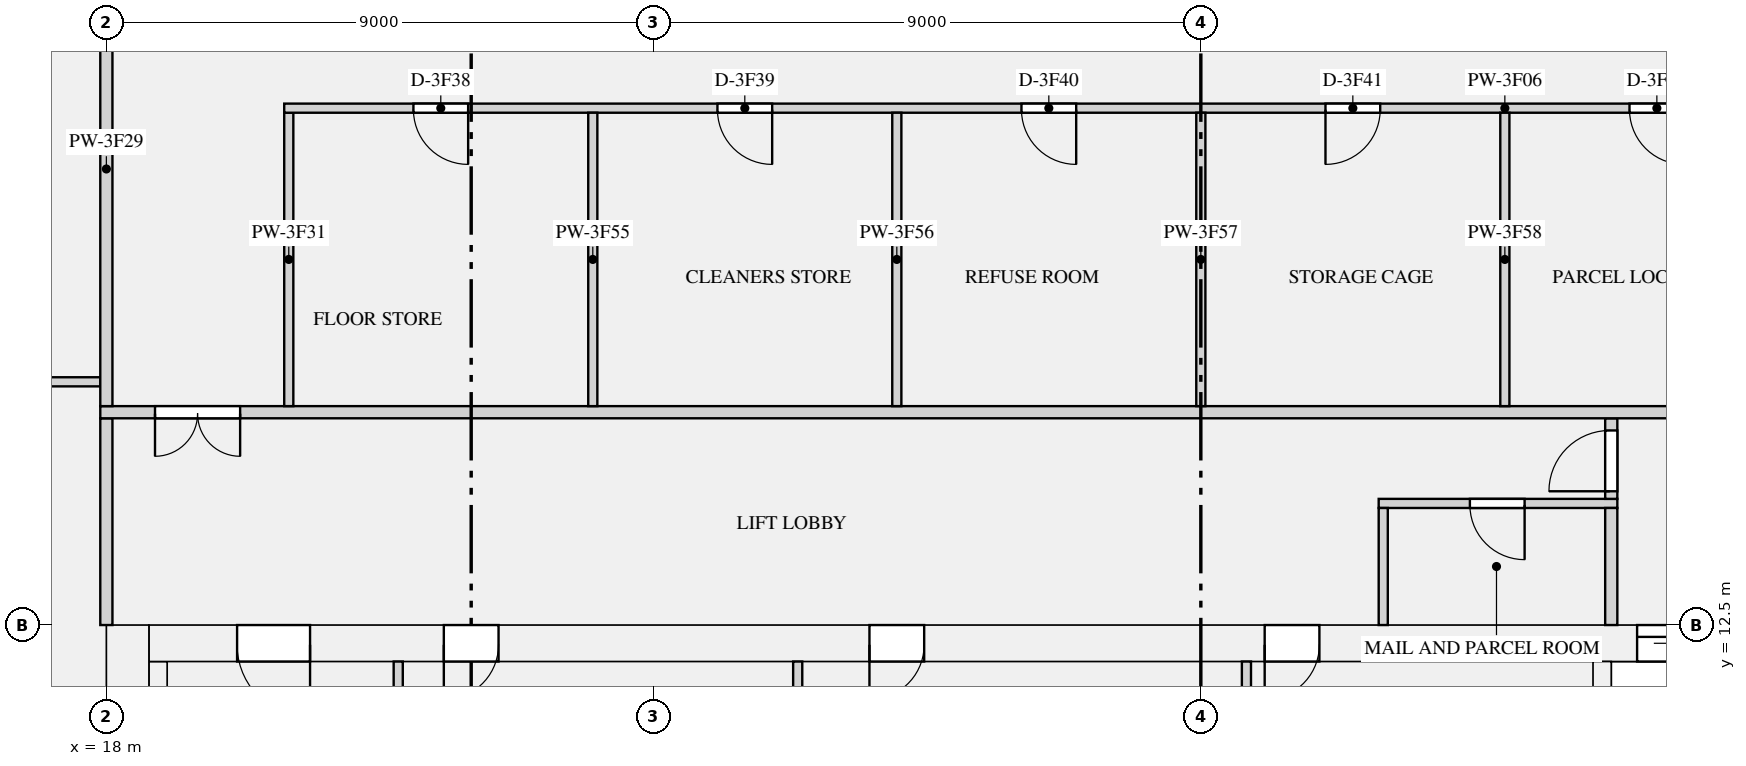
"""IFC4 building model, lengths in metres.
Left out: names, types, materials, properties, quantities, classifications, styles, units other than length and angle.
Written with IfcOpenShell. Run it as: python <this file> out.ifc"""

import sys

from ifc_helpers import new_model, si_unit, direction, frame, frame_2d, origin, place, context, subcontext, project, spatial, rectangle, extrude, element, fill, save


model = new_model("IFC4")
c1 = context("Model", 3, precision=1e-05, world=origin(), true_north=direction((0.0, 1.0)))
c2 = subcontext(c1, "Body", "Model", "MODEL_VIEW")
j1 = project(units=[si_unit("LENGTHUNIT", "METRE"), si_unit("PLANEANGLEUNIT", "RADIAN")], contexts=[c1])
p1 = place(None, origin())
s1 = spatial("IfcSite", under=j1, at=p1, CompositionType="ELEMENT")
p2 = place(p1, origin())
s2 = spatial("IfcBuilding", under=s1, at=p2, CompositionType="ELEMENT")
p3 = place(p2, frame((0.0, 0.0, 179.1)))
s3 = spatial("IfcBuildingStorey", under=s2, at=p3, CompositionType="ELEMENT", Elevation=179.1)
p4 = place(p3, frame((18.35, 0.0, 0.0), z_axis=(0.0, 0.0, 1.0), x_axis=(0.0, 1.0, 0.0)))
e1 = element("IfcWall", 1, at=p4, inside=s3, PredefinedType="SHEAR", context=c2, shape_type="SweptSolid", body=[
    extrude(rectangle(XDim=12.5, YDim=0.7, at=frame_2d((6.25, 0.0))), origin(), (0.0, 0.0, 1.0), 3.15),
])
p5 = place(p3, frame((18.7, 12.2, 0.0), z_axis=(0.0, 0.0, 1.0), x_axis=(1.0, 0.0, 0.0)))
e2 = element("IfcWall", 2, at=p5, inside=s3, PredefinedType="SHEAR", context=c2, shape_type="SweptSolid", body=[
    extrude(rectangle(XDim=34.6, YDim=0.6, at=frame_2d((17.3, 0.0))), origin(), (0.0, 0.0, 1.0), 3.15),
])
p6 = place(p5, frame((24.475, 0.0, 0.0)))
e3 = element("IfcOpeningElement", 3, at=p6, cuts=e2, PredefinedType="OPENING", context=c2, shape_type="SweptSolid", body=[
    extrude(rectangle(XDim=1.1, YDim=2.1, at=frame_2d((0.55, 1.05))), frame((0.0, 0.31, 0.0), z_axis=(0.0, -1.0, 0.0), x_axis=(1.0, 0.0, 0.0)), (0.0, 0.0, 1.0), 0.62),
])
p7 = place(p5, frame((26.725, 0.0, 0.0)))
e4 = element("IfcOpeningElement", 4, at=p7, cuts=e2, PredefinedType="OPENING", context=c2, shape_type="SweptSolid", body=[
    extrude(rectangle(XDim=1.1, YDim=2.1, at=frame_2d((0.55, 1.05))), frame((0.0, 0.31, 0.0), z_axis=(0.0, -1.0, 0.0), x_axis=(1.0, 0.0, 0.0)), (0.0, 0.0, 1.0), 0.62),
])
p8 = place(p5, frame((28.975, 0.0, 0.0)))
e5 = element("IfcOpeningElement", 5, at=p8, cuts=e2, PredefinedType="OPENING", context=c2, shape_type="SweptSolid", body=[
    extrude(rectangle(XDim=1.1, YDim=2.1, at=frame_2d((0.55, 1.05))), frame((0.0, 0.31, 0.0), z_axis=(0.0, -1.0, 0.0), x_axis=(1.0, 0.0, 0.0)), (0.0, 0.0, 1.0), 0.62),
])
p9 = place(p5, frame((4.85, 0.0, 0.0)))
e6 = element("IfcOpeningElement", 6, at=p9, cuts=e2, PredefinedType="OPENING", context=c2, shape_type="SweptSolid", body=[
    extrude(rectangle(XDim=0.9, YDim=2.1, at=frame_2d((0.45, 1.05))), frame((0.0, 0.31, 0.0), z_axis=(0.0, -1.0, 0.0), x_axis=(1.0, 0.0, 0.0)), (0.0, 0.0, 1.0), 0.62),
])
p10 = place(p5, frame((11.85, 0.0, 0.0)))
e7 = element("IfcOpeningElement", 7, at=p10, cuts=e2, PredefinedType="OPENING", context=c2, shape_type="SweptSolid", body=[
    extrude(rectangle(XDim=0.9, YDim=2.1, at=frame_2d((0.45, 1.05))), frame((0.0, 0.31, 0.0), z_axis=(0.0, -1.0, 0.0), x_axis=(1.0, 0.0, 0.0)), (0.0, 0.0, 1.0), 0.62),
])
p11 = place(p5, frame((18.35, 0.0, 0.0)))
e8 = element("IfcOpeningElement", 8, at=p11, cuts=e2, PredefinedType="OPENING", context=c2, shape_type="SweptSolid", body=[
    extrude(rectangle(XDim=0.9, YDim=2.1, at=frame_2d((0.45, 1.05))), frame((0.0, 0.31, 0.0), z_axis=(0.0, -1.0, 0.0), x_axis=(1.0, 0.0, 0.0)), (0.0, 0.0, 1.0), 0.62),
])
p12 = place(p5, frame((1.45, 0.0, 0.0)))
e9 = element("IfcOpeningElement", 9, at=p12, cuts=e2, PredefinedType="OPENING", context=c2, shape_type="SweptSolid", body=[
    extrude(rectangle(XDim=1.2, YDim=2.1, at=frame_2d((0.6, 1.05))), frame((0.0, 0.31, 0.0), z_axis=(0.0, -1.0, 0.0), x_axis=(1.0, 0.0, 0.0)), (0.0, 0.0, 1.0), 0.62),
])
p13 = place(p5, frame((31.95, 0.0, 0.0)))
e10 = element("IfcOpeningElement", 10, at=p13, cuts=e2, PredefinedType="OPENING", context=c2, shape_type="SweptSolid", body=[
    extrude(rectangle(XDim=1.2, YDim=2.1, at=frame_2d((0.6, 1.05))), frame((0.0, 0.31, 0.0), z_axis=(0.0, -1.0, 0.0), x_axis=(1.0, 0.0, 0.0)), (0.0, 0.0, 1.0), 0.62),
])
p14 = place(p3, frame((18.85, 1.0, 0.0), z_axis=(0.0, 0.0, 1.0), x_axis=(0.0, 1.0, 0.0)))
e11 = element("IfcWall", 11, at=p14, inside=s3, PredefinedType="SHEAR", context=c2, shape_type="SweptSolid", body=[
    extrude(rectangle(XDim=10.9, YDim=0.3, at=frame_2d((5.45, 0.0))), origin(), (0.0, 0.0, 1.0), 3.15),
])
p15 = place(p3, frame((42.6, 8.25, 0.0), z_axis=(0.0, 0.0, 1.0), x_axis=(0.0, 1.0, 0.0)))
e12 = element("IfcWall", 12, at=p15, inside=s3, PredefinedType="SHEAR", context=c2, shape_type="SweptSolid", body=[
    extrude(rectangle(XDim=3.65, YDim=0.3, at=frame_2d((1.825, 0.0))), origin(), (0.0, 0.0, 1.0), 3.15),
])
p16 = place(p3, frame((38.925, 14.5, 0.0), z_axis=(0.0, 0.0, 1.0), x_axis=(1.0, 0.0, 0.0)))
e13 = element("IfcWall", 13, at=p16, inside=s3, PredefinedType="PARTITIONING", context=c2, shape_type="SweptSolid", body=[
    extrude(rectangle(XDim=3.925, YDim=0.15, at=frame_2d((1.962, 0.0))), origin(), (0.0, 0.0, 1.0), 2.83),
])
p17 = place(p16, frame((1.5, 0.0, 0.0)))
e14 = element("IfcOpeningElement", 14, at=p17, cuts=e13, PredefinedType="OPENING", context=c2, shape_type="SweptSolid", body=[
    extrude(rectangle(XDim=0.9, YDim=2.1, at=frame_2d((0.45, 1.05))), frame((0.0, 0.085, 0.0), z_axis=(0.0, -1.0, 0.0), x_axis=(1.0, 0.0, 0.0)), (0.0, 0.0, 1.0), 0.17),
])
for number, where, z_axis, x_axis in (
    (15, (22.8, 9.505, 0.0), (0.0, 0.0, 1.0), (0.0, 1.0, 0.0)),
    (16, (29.37, 9.505, 0.0), (0.0, 0.0, 1.0), (0.0, 1.0, 0.0)),
    (17, (36.75, 9.505, 0.0), (0.0, 0.0, 1.0), (0.0, 1.0, 0.0)),
):
    element("IfcWall", number, at=place(p3, frame(where, z_axis=z_axis, x_axis=x_axis)), inside=s3, PredefinedType="PARTITIONING", context=c2, shape_type="SweptSolid", body=[
        extrude(rectangle(XDim=2.395, YDim=0.15, at=frame_2d((1.198, 0.0))), origin(), (0.0, 0.0, 1.0), 2.83),
    ])
p18 = place(p3, frame((18.0, 12.5, 0.0), z_axis=(0.0, 0.0, 1.0), x_axis=(0.0, 1.0, 0.0)))
e18 = element("IfcWall", 18, at=p18, inside=s3, PredefinedType="PARTITIONING", context=c2, shape_type="SweptSolid", body=[
    extrude(rectangle(XDim=3.4, YDim=0.2, at=frame_2d((1.7, 0.0))), origin(), (0.0, 0.0, 1.0), 2.83),
])
p19 = place(p3, frame((39.0, 12.5, 0.0), z_axis=(0.0, 0.0, 1.0), x_axis=(0.0, 1.0, 0.0)))
e19 = element("IfcWall", 19, at=p19, inside=s3, PredefinedType="PARTITIONING", context=c2, shape_type="SweptSolid", body=[
    extrude(rectangle(XDim=1.925, YDim=0.15, at=frame_2d((0.962, 0.0))), origin(), (0.0, 0.0, 1.0), 2.83),
])
p20 = place(p3, frame((42.75, 12.5, 0.0), z_axis=(0.0, 0.0, 1.0), x_axis=(0.0, 1.0, 0.0)))
e20 = element("IfcWall", 20, at=p20, inside=s3, PredefinedType="PARTITIONING", context=c2, shape_type="SweptSolid", body=[
    extrude(rectangle(XDim=1.925, YDim=0.2, at=frame_2d((0.962, 0.0))), origin(), (0.0, 0.0, 1.0), 2.83),
])
p21 = place(p3, frame((42.75, 14.575, 0.0), z_axis=(0.0, 0.0, 1.0), x_axis=(0.0, 1.0, 0.0)))
e21 = element("IfcWall", 21, at=p21, inside=s3, PredefinedType="PARTITIONING", context=c2, shape_type="SweptSolid", body=[
    extrude(rectangle(XDim=1.325, YDim=0.2, at=frame_2d((0.663, 0.0))), origin(), (0.0, 0.0, 1.0), 2.83),
])
p22 = place(p21, frame((0.125, 0.0, 0.0)))
e22 = element("IfcOpeningElement", 22, at=p22, cuts=e21, PredefinedType="OPENING", context=c2, shape_type="SweptSolid", body=[
    extrude(rectangle(XDim=1.0, YDim=2.1, at=frame_2d((0.5, 1.05))), frame((0.0, 0.11, 0.0), z_axis=(0.0, -1.0, 0.0), x_axis=(1.0, 0.0, 0.0)), (0.0, 0.0, 1.0), 0.22),
])
p23 = place(p3, frame((20.925, 21.0, 0.0), z_axis=(0.0, 0.0, 1.0), x_axis=(1.0, 0.0, 0.0)))
e23 = element("IfcWall", 23, at=p23, inside=s3, PredefinedType="PARTITIONING", context=c2, shape_type="SweptSolid", body=[
    extrude(rectangle(XDim=30.15, YDim=0.15, at=frame_2d((15.075, 0.0))), origin(), (0.0, 0.0, 1.0), 2.83),
])
p24 = place(p23, frame((2.125, 0.0, 0.0)))
e24 = element("IfcOpeningElement", 24, at=p24, cuts=e23, PredefinedType="OPENING", context=c2, shape_type="SweptSolid", body=[
    extrude(rectangle(XDim=0.9, YDim=2.1, at=frame_2d((0.45, 1.05))), frame((0.0, 0.085, 0.0), z_axis=(0.0, -1.0, 0.0), x_axis=(1.0, 0.0, 0.0)), (0.0, 0.0, 1.0), 0.17),
])
p25 = place(p23, frame((7.125, 0.0, 0.0)))
e25 = element("IfcOpeningElement", 25, at=p25, cuts=e23, PredefinedType="OPENING", context=c2, shape_type="SweptSolid", body=[
    extrude(rectangle(XDim=0.9, YDim=2.1, at=frame_2d((0.45, 1.05))), frame((0.0, 0.085, 0.0), z_axis=(0.0, -1.0, 0.0), x_axis=(1.0, 0.0, 0.0)), (0.0, 0.0, 1.0), 0.17),
])
p26 = place(p23, frame((12.125, 0.0, 0.0)))
e26 = element("IfcOpeningElement", 26, at=p26, cuts=e23, PredefinedType="OPENING", context=c2, shape_type="SweptSolid", body=[
    extrude(rectangle(XDim=0.9, YDim=2.1, at=frame_2d((0.45, 1.05))), frame((0.0, 0.085, 0.0), z_axis=(0.0, -1.0, 0.0), x_axis=(1.0, 0.0, 0.0)), (0.0, 0.0, 1.0), 0.17),
])
p27 = place(p23, frame((17.125, 0.0, 0.0)))
e27 = element("IfcOpeningElement", 27, at=p27, cuts=e23, PredefinedType="OPENING", context=c2, shape_type="SweptSolid", body=[
    extrude(rectangle(XDim=0.9, YDim=2.1, at=frame_2d((0.45, 1.05))), frame((0.0, 0.085, 0.0), z_axis=(0.0, -1.0, 0.0), x_axis=(1.0, 0.0, 0.0)), (0.0, 0.0, 1.0), 0.17),
])
p28 = place(p23, frame((22.125, 0.0, 0.0)))
e28 = element("IfcOpeningElement", 28, at=p28, cuts=e23, PredefinedType="OPENING", context=c2, shape_type="SweptSolid", body=[
    extrude(rectangle(XDim=0.9, YDim=2.1, at=frame_2d((0.45, 1.05))), frame((0.0, 0.085, 0.0), z_axis=(0.0, -1.0, 0.0), x_axis=(1.0, 0.0, 0.0)), (0.0, 0.0, 1.0), 0.17),
])
p29 = place(p23, frame((27.125, 0.0, 0.0)))
e29 = element("IfcOpeningElement", 29, at=p29, cuts=e23, PredefinedType="OPENING", context=c2, shape_type="SweptSolid", body=[
    extrude(rectangle(XDim=0.9, YDim=2.1, at=frame_2d((0.45, 1.05))), frame((0.0, 0.085, 0.0), z_axis=(0.0, -1.0, 0.0), x_axis=(1.0, 0.0, 0.0)), (0.0, 0.0, 1.0), 0.17),
])
p30 = place(p3, frame((7.7, 16.5, 0.0), z_axis=(0.0, 0.0, 1.0), x_axis=(1.0, 0.0, 0.0)))
e30 = element("IfcWall", 30, at=p30, inside=s3, PredefinedType="PARTITIONING", context=c2, shape_type="SweptSolid", body=[
    extrude(rectangle(XDim=10.2, YDim=0.15, at=frame_2d((5.1, 0.0))), origin(), (0.0, 0.0, 1.0), 2.83),
])
p31 = place(p30, frame((7.3, 0.0, 0.0)))
e31 = element("IfcOpeningElement", 31, at=p31, cuts=e30, PredefinedType="OPENING", context=c2, shape_type="SweptSolid", body=[
    extrude(rectangle(XDim=1.5, YDim=2.1, at=frame_2d((0.75, 1.05))), frame((0.0, 0.085, 0.0), z_axis=(0.0, -1.0, 0.0), x_axis=(1.0, 0.0, 0.0)), (0.0, 0.0, 1.0), 0.17),
])
p32 = place(p3, frame((17.9, 16.0, 0.0), z_axis=(0.0, 0.0, 1.0), x_axis=(1.0, 0.0, 0.0)))
e32 = element("IfcWall", 32, at=p32, inside=s3, PredefinedType="PARTITIONING", context=c2, shape_type="SweptSolid", body=[
    extrude(rectangle(XDim=36.2, YDim=0.2, at=frame_2d((18.1, 0.0))), origin(), (0.0, 0.0, 1.0), 2.83),
])
p33 = place(p32, frame((0.9, 0.0, 0.0)))
e33 = element("IfcOpeningElement", 33, at=p33, cuts=e32, PredefinedType="OPENING", context=c2, shape_type="SweptSolid", body=[
    extrude(rectangle(XDim=1.4, YDim=2.1, at=frame_2d((0.7, 1.05))), frame((0.0, 0.11, 0.0), z_axis=(0.0, -1.0, 0.0), x_axis=(1.0, 0.0, 0.0)), (0.0, 0.0, 1.0), 0.22),
])
p34 = place(p32, frame((33.9, 0.0, 0.0)))
e34 = element("IfcOpeningElement", 34, at=p34, cuts=e32, PredefinedType="OPENING", context=c2, shape_type="SweptSolid", body=[
    extrude(rectangle(XDim=1.4, YDim=2.1, at=frame_2d((0.7, 1.05))), frame((0.0, 0.11, 0.0), z_axis=(0.0, -1.0, 0.0), x_axis=(1.0, 0.0, 0.0)), (0.0, 0.0, 1.0), 0.22),
])
p35 = place(p3, frame((18.0, 16.1, 0.0), z_axis=(0.0, 0.0, 1.0), x_axis=(0.0, 1.0, 0.0)))
e35 = element("IfcWall", 35, at=p35, inside=s3, PredefinedType="PARTITIONING", context=c2, shape_type="SweptSolid", body=[
    extrude(rectangle(XDim=7.8, YDim=0.2, at=frame_2d((3.9, 0.0))), origin(), (0.0, 0.0, 1.0), 2.83),
])
for number, where, z_axis, x_axis in (
    (36, (21.0, 16.1, 0.0), (0.0, 0.0, 1.0), (0.0, 1.0, 0.0)),
    (37, (26.0, 16.1, 0.0), (0.0, 0.0, 1.0), (0.0, 1.0, 0.0)),
    (38, (31.0, 16.1, 0.0), (0.0, 0.0, 1.0), (0.0, 1.0, 0.0)),
    (39, (36.0, 16.1, 0.0), (0.0, 0.0, 1.0), (0.0, 1.0, 0.0)),
    (40, (41.0, 16.1, 0.0), (0.0, 0.0, 1.0), (0.0, 1.0, 0.0)),
):
    element("IfcWall", number, at=place(p3, frame(where, z_axis=z_axis, x_axis=x_axis)), inside=s3, PredefinedType="PARTITIONING", context=c2, shape_type="SweptSolid", body=[
        extrude(rectangle(XDim=4.825, YDim=0.15, at=frame_2d((2.413, 0.0))), origin(), (0.0, 0.0, 1.0), 2.83),
    ])
p36 = place(p6, origin())
e41 = element("IfcDoor", 41, at=p36, inside=s3, OperationType="DOUBLE_DOOR_SLIDING", PredefinedType="DOOR", context=c2, shape_type="SweptSolid", body=[
    extrude(rectangle(XDim=1.1, YDim=2.1, at=frame_2d((0.55, 1.05))), frame((0.0, 0.025, 0.0), z_axis=(0.0, -1.0, 0.0), x_axis=(1.0, 0.0, 0.0)), (0.0, 0.0, 1.0), 0.05),
])
fill(e3, e41)
p37 = place(p17, frame((0.9, 0.0, 0.0), z_axis=(0.0, 0.0, 1.0), x_axis=(-1.0, 0.0, 0.0)))
e42 = element("IfcDoor", 42, at=p37, inside=s3, OperationType="SINGLE_SWING_LEFT", PredefinedType="DOOR", context=c2, shape_type="SweptSolid", body=[
    extrude(rectangle(XDim=0.9, YDim=2.1, at=frame_2d((0.45, 1.05))), frame((0.0, 0.025, 0.0), z_axis=(0.0, -1.0, 0.0), x_axis=(1.0, 0.0, 0.0)), (0.0, 0.0, 1.0), 0.05),
])
fill(e14, e42)
p38 = place(p9, frame((0.9, 0.0, 0.0), z_axis=(0.0, 0.0, 1.0), x_axis=(-1.0, 0.0, 0.0)))
e43 = element("IfcDoor", 43, at=p38, inside=s3, OperationType="SINGLE_SWING_RIGHT", PredefinedType="DOOR", context=c2, shape_type="SweptSolid", body=[
    extrude(rectangle(XDim=0.9, YDim=2.1, at=frame_2d((0.45, 1.05))), frame((0.0, 0.025, 0.0), z_axis=(0.0, -1.0, 0.0), x_axis=(1.0, 0.0, 0.0)), (0.0, 0.0, 1.0), 0.05),
])
fill(e6, e43)
p39 = place(p10, frame((0.9, 0.0, 0.0), z_axis=(0.0, 0.0, 1.0), x_axis=(-1.0, 0.0, 0.0)))
e44 = element("IfcDoor", 44, at=p39, inside=s3, OperationType="SINGLE_SWING_RIGHT", PredefinedType="DOOR", context=c2, shape_type="SweptSolid", body=[
    extrude(rectangle(XDim=0.9, YDim=2.1, at=frame_2d((0.45, 1.05))), frame((0.0, 0.025, 0.0), z_axis=(0.0, -1.0, 0.0), x_axis=(1.0, 0.0, 0.0)), (0.0, 0.0, 1.0), 0.05),
])
fill(e7, e44)
p40 = place(p11, frame((0.9, 0.0, 0.0), z_axis=(0.0, 0.0, 1.0), x_axis=(-1.0, 0.0, 0.0)))
e45 = element("IfcDoor", 45, at=p40, inside=s3, OperationType="SINGLE_SWING_RIGHT", PredefinedType="DOOR", context=c2, shape_type="SweptSolid", body=[
    extrude(rectangle(XDim=0.9, YDim=2.1, at=frame_2d((0.45, 1.05))), frame((0.0, 0.025, 0.0), z_axis=(0.0, -1.0, 0.0), x_axis=(1.0, 0.0, 0.0)), (0.0, 0.0, 1.0), 0.05),
])
fill(e8, e45)
p41 = place(p12, frame((1.2, 0.0, 0.0), z_axis=(0.0, 0.0, 1.0), x_axis=(-1.0, 0.0, 0.0)))
e46 = element("IfcDoor", 46, at=p41, inside=s3, OperationType="SINGLE_SWING_LEFT", PredefinedType="DOOR", context=c2, shape_type="SweptSolid", body=[
    extrude(rectangle(XDim=1.2, YDim=2.1, at=frame_2d((0.6, 1.05))), frame((0.0, 0.025, 0.0), z_axis=(0.0, -1.0, 0.0), x_axis=(1.0, 0.0, 0.0)), (0.0, 0.0, 1.0), 0.05),
])
fill(e9, e46)
p42 = place(p22, origin())
e47 = element("IfcDoor", 47, at=p42, inside=s3, OperationType="SINGLE_SWING_LEFT", PredefinedType="DOOR", context=c2, shape_type="SweptSolid", body=[
    extrude(rectangle(XDim=1.0, YDim=2.1, at=frame_2d((0.5, 1.05))), frame((0.0, 0.025, 0.0), z_axis=(0.0, -1.0, 0.0), x_axis=(1.0, 0.0, 0.0)), (0.0, 0.0, 1.0), 0.05),
])
fill(e22, e47)
p43 = place(p33, frame((1.4, 0.0, 0.0), z_axis=(0.0, 0.0, 1.0), x_axis=(-1.0, 0.0, 0.0)))
e48 = element("IfcDoor", 48, at=p43, inside=s3, OperationType="DOUBLE_DOOR_SINGLE_SWING", PredefinedType="DOOR", context=c2, shape_type="SweptSolid", body=[
    extrude(rectangle(XDim=1.4, YDim=2.1, at=frame_2d((0.7, 1.05))), frame((0.0, 0.025, 0.0), z_axis=(0.0, -1.0, 0.0), x_axis=(1.0, 0.0, 0.0)), (0.0, 0.0, 1.0), 0.05),
])
fill(e33, e48)
p44 = place(p24, frame((0.9, 0.0, 0.0), z_axis=(0.0, 0.0, 1.0), x_axis=(-1.0, 0.0, 0.0)))
e49 = element("IfcDoor", 49, at=p44, inside=s3, OperationType="SINGLE_SWING_LEFT", PredefinedType="DOOR", context=c2, shape_type="SweptSolid", body=[
    extrude(rectangle(XDim=0.9, YDim=2.1, at=frame_2d((0.45, 1.05))), frame((0.0, 0.025, 0.0), z_axis=(0.0, -1.0, 0.0), x_axis=(1.0, 0.0, 0.0)), (0.0, 0.0, 1.0), 0.05),
])
fill(e24, e49)
p45 = place(p25, frame((0.9, 0.0, 0.0), z_axis=(0.0, 0.0, 1.0), x_axis=(-1.0, 0.0, 0.0)))
e50 = element("IfcDoor", 50, at=p45, inside=s3, OperationType="SINGLE_SWING_LEFT", PredefinedType="DOOR", context=c2, shape_type="SweptSolid", body=[
    extrude(rectangle(XDim=0.9, YDim=2.1, at=frame_2d((0.45, 1.05))), frame((0.0, 0.025, 0.0), z_axis=(0.0, -1.0, 0.0), x_axis=(1.0, 0.0, 0.0)), (0.0, 0.0, 1.0), 0.05),
])
fill(e25, e50)
p46 = place(p26, frame((0.9, 0.0, 0.0), z_axis=(0.0, 0.0, 1.0), x_axis=(-1.0, 0.0, 0.0)))
e51 = element("IfcDoor", 51, at=p46, inside=s3, OperationType="SINGLE_SWING_LEFT", PredefinedType="DOOR", context=c2, shape_type="SweptSolid", body=[
    extrude(rectangle(XDim=0.9, YDim=2.1, at=frame_2d((0.45, 1.05))), frame((0.0, 0.025, 0.0), z_axis=(0.0, -1.0, 0.0), x_axis=(1.0, 0.0, 0.0)), (0.0, 0.0, 1.0), 0.05),
])
fill(e26, e51)
p47 = place(p27, frame((0.9, 0.0, 0.0), z_axis=(0.0, 0.0, 1.0), x_axis=(-1.0, 0.0, 0.0)))
e52 = element("IfcDoor", 52, at=p47, inside=s3, OperationType="SINGLE_SWING_RIGHT", PredefinedType="DOOR", context=c2, shape_type="SweptSolid", body=[
    extrude(rectangle(XDim=0.9, YDim=2.1, at=frame_2d((0.45, 1.05))), frame((0.0, 0.025, 0.0), z_axis=(0.0, -1.0, 0.0), x_axis=(1.0, 0.0, 0.0)), (0.0, 0.0, 1.0), 0.05),
])
fill(e27, e52)
p48 = place(p28, frame((0.9, 0.0, 0.0), z_axis=(0.0, 0.0, 1.0), x_axis=(-1.0, 0.0, 0.0)))
e53 = element("IfcDoor", 53, at=p48, inside=s3, OperationType="SINGLE_SWING_LEFT", PredefinedType="DOOR", context=c2, shape_type="SweptSolid", body=[
    extrude(rectangle(XDim=0.9, YDim=2.1, at=frame_2d((0.45, 1.05))), frame((0.0, 0.025, 0.0), z_axis=(0.0, -1.0, 0.0), x_axis=(1.0, 0.0, 0.0)), (0.0, 0.0, 1.0), 0.05),
])
fill(e28, e53)
save(model, sys.argv[1])
